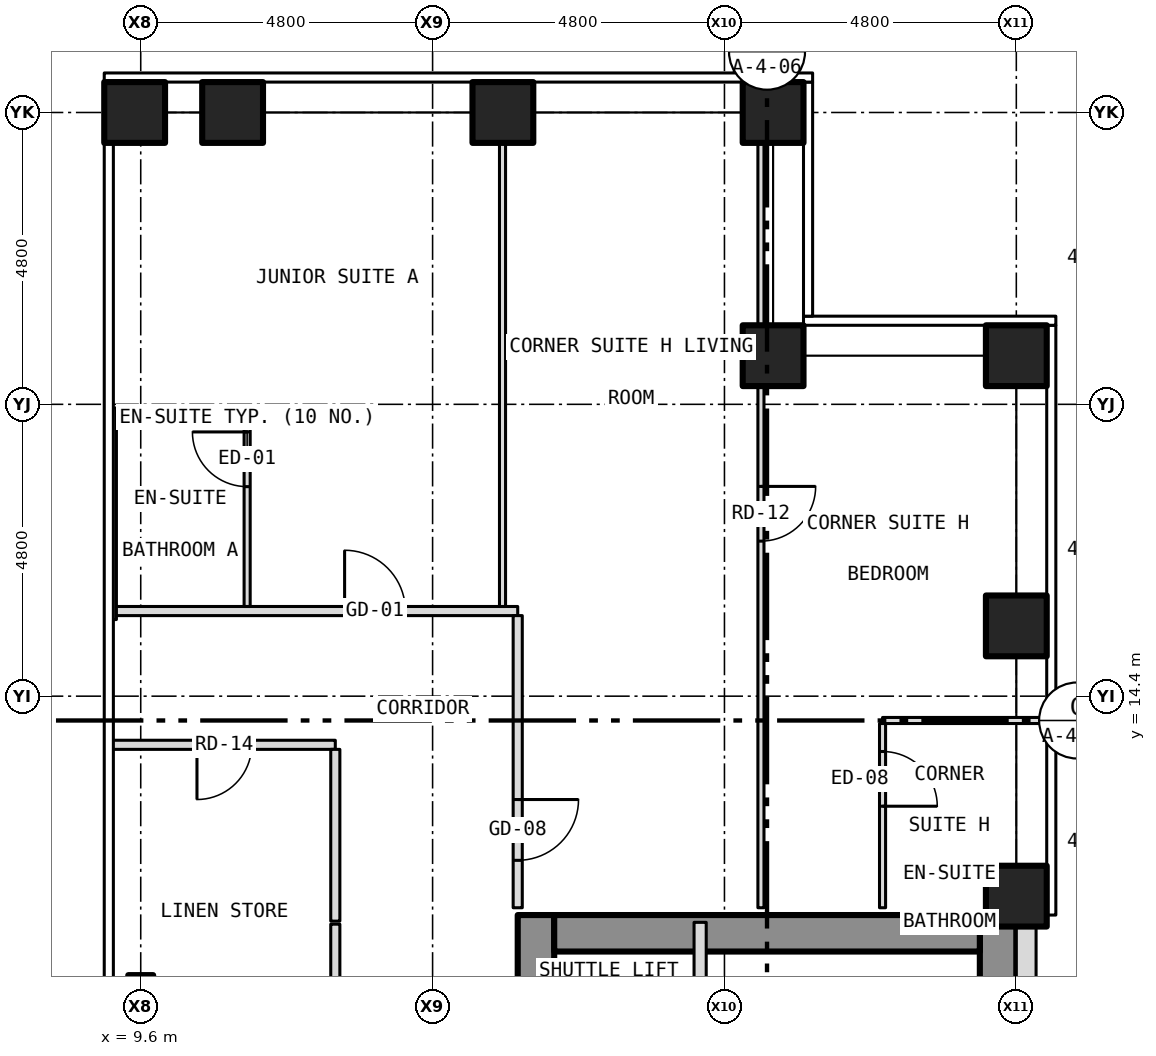
"""IFC4 building model, lengths in metres.
Left out: names, types, materials, properties, quantities, classifications, styles, units other than length and angle.
Written with IfcOpenShell. Run it as: python <this file> out.ifc"""

import sys

from ifc_helpers import new_model, si_unit, direction, frame, frame_2d, origin, origin_2d, place, context, subcontext, project, spatial, rectangle, hollow_rectangle, i_section, extrude, element, fill, save


model = new_model("IFC4")
c1 = context("Model", 3, precision=1e-05, world=origin(), true_north=direction((0.0, 1.0)))
c2 = subcontext(c1, "Body", "Model", "MODEL_VIEW")
j1 = project(units=[si_unit("LENGTHUNIT", "METRE"), si_unit("PLANEANGLEUNIT", "RADIAN")], contexts=[c1])
p1 = place(None, origin())
s1 = spatial("IfcSite", under=j1, at=p1, CompositionType="ELEMENT")
p2 = place(p1, origin())
s2 = spatial("IfcBuilding", under=s1, at=p2, CompositionType="ELEMENT")
p3 = place(p2, frame((0.0, 0.0, 81.0)))
s3 = spatial("IfcBuildingStorey", under=s2, at=p3, CompositionType="ELEMENT", Elevation=81.0)
for number, where, z_axis, x_axis in (
    (1, (11.111, 24.0, -0.15), (0.0, 0.0, 1.0), (1.0, 0.0, 0.0)),
    (2, (15.556, 24.0, -0.15), (0.0, 0.0, 1.0), (1.0, 0.0, 0.0)),
    (3, (20.0, 24.0, -0.15), (0.0, 0.0, 1.0), (1.0, 0.0, 0.0)),
    (4, (24.0, 11.111, -0.15), (0.0, 0.0, 1.0), (1.0, 0.0, 0.0)),
    (5, (24.0, 15.556, -0.15), (0.0, 0.0, 1.0), (1.0, 0.0, 0.0)),
    (6, (24.0, 20.0, -0.15), (0.0, 0.0, 1.0), (1.0, 0.0, 0.0)),
    (7, (20.0, 20.0, -0.15), (0.0, 0.0, 1.0), (1.0, 0.0, 0.0)),
    (8, (9.5, 24.0, -0.15), (0.0, 0.0, 1.0), (1.0, 0.0, 0.0)),
):
    element("IfcColumn", number, at=place(p3, frame(where, z_axis=z_axis, x_axis=x_axis)), inside=s3, PredefinedType="COLUMN", context=c2, shape_type="SweptSolid", body=[
        extrude(hollow_rectangle(XDim=1.0, YDim=1.0, WallThickness=0.06, at=origin_2d()), origin(), (0.0, 0.0, 1.0), 3.35),
    ])
p4 = place(p3, frame((9.6, 9.6, -0.15), z_axis=(0.0, 0.0, 1.0), x_axis=(1.0, 0.0, 0.0)))
e9 = element("IfcColumn", 9, at=p4, inside=s3, PredefinedType="COLUMN", context=c2, shape_type="SweptSolid", body=[
    extrude(i_section(OverallWidth=0.409, OverallDepth=0.424, WebThickness=0.033, FlangeThickness=0.052, at=origin_2d()), origin(), (0.0, 0.0, 1.0), 3.35),
])
p5 = place(p3, frame((16.1, -10.8, 0.0), z_axis=(0.0, 0.0, 1.0), x_axis=(0.0, 1.0, 0.0)))
e10 = element("IfcWall", 10, at=p5, inside=s3, PredefinedType="SHEAR", context=c2, shape_type="SweptSolid", body=[
    extrude(rectangle(XDim=21.6, YDim=0.6, at=frame_2d((10.8, 0.0))), origin(), (0.0, 0.0, 1.0), 2.9),
])
p6 = place(p5, frame((9.4, 0.0, 0.0)))
e11 = element("IfcOpeningElement", 11, at=p6, cuts=e10, PredefinedType="OPENING", context=c2, shape_type="SweptSolid", body=[
    extrude(rectangle(XDim=1.1, YDim=2.1, at=frame_2d((0.55, 1.05))), frame((0.0, 0.312, 0.0), z_axis=(0.0, -1.0, 0.0), x_axis=(1.0, 0.0, 0.0)), (0.0, 0.0, 1.0), 0.624),
])
p7 = place(p5, frame((11.5, 0.0, 0.0)))
e12 = element("IfcOpeningElement", 12, at=p7, cuts=e10, PredefinedType="OPENING", context=c2, shape_type="SweptSolid", body=[
    extrude(rectangle(XDim=1.1, YDim=2.1, at=frame_2d((0.55, 1.05))), frame((0.0, 0.312, 0.0), z_axis=(0.0, -1.0, 0.0), x_axis=(1.0, 0.0, 0.0)), (0.0, 0.0, 1.0), 0.624),
])
p8 = place(p5, frame((13.6, 0.0, 0.0)))
e13 = element("IfcOpeningElement", 13, at=p8, cuts=e10, PredefinedType="OPENING", context=c2, shape_type="SweptSolid", body=[
    extrude(rectangle(XDim=1.1, YDim=2.1, at=frame_2d((0.55, 1.05))), frame((0.0, 0.312, 0.0), z_axis=(0.0, -1.0, 0.0), x_axis=(1.0, 0.0, 0.0)), (0.0, 0.0, 1.0), 0.624),
])
p9 = place(p5, frame((15.7, 0.0, 0.0)))
e14 = element("IfcOpeningElement", 14, at=p9, cuts=e10, PredefinedType="OPENING", context=c2, shape_type="SweptSolid", body=[
    extrude(rectangle(XDim=1.1, YDim=2.1, at=frame_2d((0.55, 1.05))), frame((0.0, 0.312, 0.0), z_axis=(0.0, -1.0, 0.0), x_axis=(1.0, 0.0, 0.0)), (0.0, 0.0, 1.0), 0.624),
])
p10 = place(p5, frame((17.8, 0.0, 0.0)))
e15 = element("IfcOpeningElement", 15, at=p10, cuts=e10, PredefinedType="OPENING", context=c2, shape_type="SweptSolid", body=[
    extrude(rectangle(XDim=1.1, YDim=2.1, at=frame_2d((0.55, 1.05))), frame((0.0, 0.312, 0.0), z_axis=(0.0, -1.0, 0.0), x_axis=(1.0, 0.0, 0.0)), (0.0, 0.0, 1.0), 0.624),
])
p11 = place(p5, frame((5.642, 0.0, 0.0)))
e16 = element("IfcOpeningElement", 16, at=p11, cuts=e10, PredefinedType="OPENING", context=c2, shape_type="SweptSolid", body=[
    extrude(rectangle(XDim=1.1, YDim=2.1, at=frame_2d((0.55, 1.05))), frame((0.0, 0.312, 0.0), z_axis=(0.0, -1.0, 0.0), x_axis=(1.0, 0.0, 0.0)), (0.0, 0.0, 1.0), 0.624),
])
p12 = place(p5, frame((7.5, 0.0, 0.0)))
e17 = element("IfcOpeningElement", 17, at=p12, cuts=e10, PredefinedType="OPENING", context=c2, shape_type="SweptSolid", body=[
    extrude(rectangle(XDim=1.1, YDim=2.1, at=frame_2d((0.55, 1.05))), frame((0.0, 0.312, 0.0), z_axis=(0.0, -1.0, 0.0), x_axis=(1.0, 0.0, 0.0)), (0.0, 0.0, 1.0), 0.624),
])
p13 = place(p3, frame((23.7, -10.8, 0.0), z_axis=(0.0, 0.0, 1.0), x_axis=(0.0, 1.0, 0.0)))
e18 = element("IfcWall", 18, at=p13, inside=s3, PredefinedType="SHEAR", context=c2, shape_type="SweptSolid", body=[
    extrude(rectangle(XDim=21.6, YDim=0.6, at=frame_2d((10.8, 0.0))), origin(), (0.0, 0.0, 1.0), 2.9),
])
p14 = place(p3, frame((16.4, 10.5, 0.0), z_axis=(0.0, 0.0, 1.0), x_axis=(1.0, 0.0, 0.0)))
e19 = element("IfcWall", 19, at=p14, inside=s3, PredefinedType="SHEAR", context=c2, shape_type="SweptSolid", body=[
    extrude(rectangle(XDim=7.0, YDim=0.6, at=frame_2d((3.5, 0.0))), origin(), (0.0, 0.0, 1.0), 2.9),
])
p15 = place(p3, frame((24.163, -10.8, 0.0), z_axis=(0.0, 0.0, 1.0), x_axis=(0.0, 1.0, 0.0)))
e20 = element("IfcWall", 20, at=p15, inside=s3, PredefinedType="SOLIDWALL", context=c2, shape_type="SweptSolid", body=[
    extrude(rectangle(XDim=21.6, YDim=0.325, at=frame_2d((10.8, 0.0))), origin(), (0.0, 0.0, 1.0), 3.5),
])
p16 = place(p15, frame((2.95, 0.0, 1.0)))
e21 = element("IfcOpeningElement", 21, at=p16, cuts=e20, PredefinedType="OPENING", context=c2, shape_type="SweptSolid", body=[
    extrude(rectangle(XDim=0.6, YDim=1.5, at=frame_2d((0.3, 0.75))), frame((0.0, 0.175, 0.0), z_axis=(0.0, -1.0, 0.0), x_axis=(1.0, 0.0, 0.0)), (0.0, 0.0, 1.0), 0.349),
])
p17 = place(p3, frame((9.12, 13.6, 0.0), z_axis=(0.0, 0.0, 1.0), x_axis=(1.0, 0.0, 0.0)))
e22 = element("IfcWall", 22, at=p17, inside=s3, PredefinedType="PARTITIONING", context=c2, shape_type="SweptSolid", body=[
    extrude(rectangle(XDim=3.68, YDim=0.15, at=frame_2d((1.84, 0.0))), origin(), (0.0, 0.0, 1.0), 3.2),
])
p18 = place(p17, frame((1.405, 0.0, 0.0)))
e23 = element("IfcOpeningElement", 23, at=p18, cuts=e22, PredefinedType="OPENING", context=c2, shape_type="SweptSolid", body=[
    extrude(rectangle(XDim=0.9, YDim=2.1, at=frame_2d((0.45, 1.05))), frame((0.0, 0.087, 0.0), z_axis=(0.0, -1.0, 0.0), x_axis=(1.0, 0.0, 0.0)), (0.0, 0.0, 1.0), 0.174),
])
p19 = place(p3, frame((21.8, 14.0, 0.0), z_axis=(0.0, 0.0, 1.0), x_axis=(1.0, 0.0, 0.0)))
e24 = element("IfcWall", 24, at=p19, inside=s3, PredefinedType="PARTITIONING", context=c2, shape_type="SweptSolid", body=[
    extrude(rectangle(XDim=2.73, YDim=0.1, at=frame_2d((1.365, 0.0))), origin(), (0.0, 0.0, 1.0), 3.2),
])
p20 = place(p3, frame((9.15, 15.8, 0.0), z_axis=(0.0, 0.0, 1.0), x_axis=(1.0, 0.0, 0.0)))
e25 = element("IfcWall", 25, at=p20, inside=s3, PredefinedType="PARTITIONING", context=c2, shape_type="SweptSolid", body=[
    extrude(rectangle(XDim=6.65, YDim=0.15, at=frame_2d((3.325, 0.0))), origin(), (0.0, 0.0, 1.0), 3.2),
])
p21 = place(p20, frame((3.803, 0.0, 0.0)))
e26 = element("IfcOpeningElement", 26, at=p21, cuts=e25, PredefinedType="OPENING", context=c2, shape_type="SweptSolid", body=[
    extrude(rectangle(XDim=1.0, YDim=2.1, at=frame_2d((0.5, 1.05))), frame((0.0, 0.087, 0.0), z_axis=(0.0, -1.0, 0.0), x_axis=(1.0, 0.0, 0.0)), (0.0, 0.0, 1.0), 0.174),
])
p22 = place(p3, frame((9.15, 19.0, 0.0), z_axis=(0.0, 0.0, 1.0), x_axis=(1.0, 0.0, 0.0)))
e27 = element("IfcWall", 27, at=p22, inside=s3, PredefinedType="PARTITIONING", context=c2, shape_type="SweptSolid", body=[
    extrude(rectangle(XDim=2.2, YDim=0.1, at=frame_2d((1.1, 0.0))), origin(), (0.0, 0.0, 1.0), 3.2),
])
p23 = place(p3, frame((9.15, 15.66, 0.0), z_axis=(0.0, 0.0, 1.0), x_axis=(0.0, 1.0, 0.0)))
e28 = element("IfcWall", 28, at=p23, inside=s3, PredefinedType="PARTITIONING", context=c2, shape_type="SweptSolid", body=[
    extrude(rectangle(XDim=3.48, YDim=0.1, at=frame_2d((1.74, 0.0))), origin(), (0.0, 0.0, 1.0), 3.2),
])
p24 = place(p3, frame((11.35, 15.875, 0.0), z_axis=(0.0, 0.0, 1.0), x_axis=(0.0, 1.0, 0.0)))
e29 = element("IfcWall", 29, at=p24, inside=s3, PredefinedType="PARTITIONING", context=c2, shape_type="SweptSolid", body=[
    extrude(rectangle(XDim=3.075, YDim=0.1, at=frame_2d((1.538, 0.0))), origin(), (0.0, 0.0, 1.0), 3.2),
])
p25 = place(p24, frame((1.971, 0.0, 0.0)))
e30 = element("IfcOpeningElement", 30, at=p25, cuts=e29, PredefinedType="OPENING", context=c2, shape_type="SweptSolid", body=[
    extrude(rectangle(XDim=0.9, YDim=2.1, at=frame_2d((0.45, 1.05))), frame((0.0, 0.062, 0.0), z_axis=(0.0, -1.0, 0.0), x_axis=(1.0, 0.0, 0.0)), (0.0, 0.0, 1.0), 0.124),
])
p26 = place(p3, frame((12.8, 8.175, 0.0), z_axis=(0.0, 0.0, 1.0), x_axis=(0.0, 1.0, 0.0)))
e31 = element("IfcWall", 31, at=p26, inside=s3, PredefinedType="PARTITIONING", context=c2, shape_type="SweptSolid", body=[
    extrude(rectangle(XDim=2.475, YDim=0.15, at=frame_2d((1.237, 0.0))), origin(), (0.0, 0.0, 1.0), 3.2),
])
p27 = place(p3, frame((12.8, 10.7, 0.0), z_axis=(0.0, 0.0, 1.0), x_axis=(0.0, 1.0, 0.0)))
e32 = element("IfcWall", 32, at=p27, inside=s3, PredefinedType="PARTITIONING", context=c2, shape_type="SweptSolid", body=[
    extrude(rectangle(XDim=2.825, YDim=0.15, at=frame_2d((1.413, 0.0))), origin(), (0.0, 0.0, 1.0), 3.2),
])
p28 = place(p3, frame((15.55, 15.875, 0.0), z_axis=(0.0, 0.0, 1.0), x_axis=(0.0, 1.0, 0.0)))
e33 = element("IfcWall", 33, at=p28, inside=s3, PredefinedType="PARTITIONING", context=c2, shape_type="SweptSolid", body=[
    extrude(rectangle(XDim=8.005, YDim=0.1, at=frame_2d((4.002, 0.0))), origin(), (0.0, 0.0, 1.0), 3.2),
])
p29 = place(p3, frame((15.8, 10.92, 0.0), z_axis=(0.0, 0.0, 1.0), x_axis=(0.0, 1.0, 0.0)))
e34 = element("IfcWall", 34, at=p29, inside=s3, PredefinedType="PARTITIONING", context=c2, shape_type="SweptSolid", body=[
    extrude(rectangle(XDim=4.805, YDim=0.15, at=frame_2d((2.403, 0.0))), origin(), (0.0, 0.0, 1.0), 3.2),
])
p30 = place(p29, frame((0.78, 0.0, 0.0)))
e35 = element("IfcOpeningElement", 35, at=p30, cuts=e34, PredefinedType="OPENING", context=c2, shape_type="SweptSolid", body=[
    extrude(rectangle(XDim=1.0, YDim=2.1, at=frame_2d((0.5, 1.05))), frame((0.0, 0.087, 0.0), z_axis=(0.0, -1.0, 0.0), x_axis=(1.0, 0.0, 0.0)), (0.0, 0.0, 1.0), 0.174),
])
p31 = place(p3, frame((18.8, -1.8, 0.0), z_axis=(0.0, 0.0, 1.0), x_axis=(0.0, 1.0, 0.0)))
e36 = element("IfcWall", 36, at=p31, inside=s3, PredefinedType="PARTITIONING", context=c2, shape_type="SweptSolid", body=[
    extrude(rectangle(XDim=12.48, YDim=0.2, at=frame_2d((6.24, 0.0))), origin(), (0.0, 0.0, 1.0), 2.9),
])
p32 = place(p3, frame((19.8, 10.92, 0.0), z_axis=(0.0, 0.0, 1.0), x_axis=(0.0, 1.0, 0.0)))
e37 = element("IfcWall", 37, at=p32, inside=s3, PredefinedType="PARTITIONING", context=c2, shape_type="SweptSolid", body=[
    extrude(rectangle(XDim=12.96, YDim=0.1, at=frame_2d((6.48, 0.0))), origin(), (0.0, 0.0, 1.0), 3.2),
])
p33 = place(p32, frame((6.03, 0.0, 0.0)))
e38 = element("IfcOpeningElement", 38, at=p33, cuts=e37, PredefinedType="OPENING", context=c2, shape_type="SweptSolid", body=[
    extrude(rectangle(XDim=0.9, YDim=2.1, at=frame_2d((0.45, 1.05))), frame((0.0, 0.062, 0.0), z_axis=(0.0, -1.0, 0.0), x_axis=(1.0, 0.0, 0.0)), (0.0, 0.0, 1.0), 0.124),
])
p34 = place(p3, frame((21.8, 10.92, 0.0), z_axis=(0.0, 0.0, 1.0), x_axis=(0.0, 1.0, 0.0)))
e39 = element("IfcWall", 39, at=p34, inside=s3, PredefinedType="PARTITIONING", context=c2, shape_type="SweptSolid", body=[
    extrude(rectangle(XDim=3.03, YDim=0.1, at=frame_2d((1.515, 0.0))), origin(), (0.0, 0.0, 1.0), 3.2),
])
p35 = place(p34, frame((1.67, 0.0, 0.0)))
e40 = element("IfcOpeningElement", 40, at=p35, cuts=e39, PredefinedType="OPENING", context=c2, shape_type="SweptSolid", body=[
    extrude(rectangle(XDim=0.9, YDim=2.1, at=frame_2d((0.45, 1.05))), frame((0.0, 0.062, 0.0), z_axis=(0.0, -1.0, 0.0), x_axis=(1.0, 0.0, 0.0)), (0.0, 0.0, 1.0), 0.124),
])
p36 = place(p21, origin())
e41 = element("IfcDoor", 41, at=p36, inside=s3, OperationType="SINGLE_SWING_LEFT", PredefinedType="DOOR", context=c2, shape_type="SweptSolid", body=[
    extrude(rectangle(XDim=1.0, YDim=2.1, at=frame_2d((0.5, 1.05))), frame((0.0, 0.025, 0.0), z_axis=(0.0, -1.0, 0.0), x_axis=(1.0, 0.0, 0.0)), (0.0, 0.0, 1.0), 0.05),
])
fill(e26, e41)
p37 = place(p25, origin())
e42 = element("IfcDoor", 42, at=p37, inside=s3, OperationType="SINGLE_SWING_RIGHT", PredefinedType="DOOR", context=c2, shape_type="SweptSolid", body=[
    extrude(rectangle(XDim=0.9, YDim=2.1, at=frame_2d((0.45, 1.05))), frame((0.0, 0.025, 0.0), z_axis=(0.0, -1.0, 0.0), x_axis=(1.0, 0.0, 0.0)), (0.0, 0.0, 1.0), 0.05),
])
fill(e30, e42)
p38 = place(p30, origin())
e43 = element("IfcDoor", 43, at=p38, inside=s3, OperationType="SINGLE_SWING_RIGHT", PredefinedType="DOOR", context=c2, shape_type="SweptSolid", body=[
    extrude(rectangle(XDim=1.0, YDim=2.1, at=frame_2d((0.5, 1.05))), frame((0.0, 0.025, 0.0), z_axis=(0.0, -1.0, 0.0), x_axis=(1.0, 0.0, 0.0)), (0.0, 0.0, 1.0), 0.05),
])
fill(e35, e43)
p39 = place(p33, origin())
e44 = element("IfcDoor", 44, at=p39, inside=s3, OperationType="SINGLE_SWING_RIGHT", PredefinedType="DOOR", context=c2, shape_type="SweptSolid", body=[
    extrude(rectangle(XDim=0.9, YDim=2.1, at=frame_2d((0.45, 1.05))), frame((0.0, 0.025, 0.0), z_axis=(0.0, -1.0, 0.0), x_axis=(1.0, 0.0, 0.0)), (0.0, 0.0, 1.0), 0.05),
])
fill(e38, e44)
p40 = place(p35, origin())
e45 = element("IfcDoor", 45, at=p40, inside=s3, OperationType="SINGLE_SWING_LEFT", PredefinedType="DOOR", context=c2, shape_type="SweptSolid", body=[
    extrude(rectangle(XDim=0.9, YDim=2.1, at=frame_2d((0.45, 1.05))), frame((0.0, 0.025, 0.0), z_axis=(0.0, -1.0, 0.0), x_axis=(1.0, 0.0, 0.0)), (0.0, 0.0, 1.0), 0.05),
])
fill(e40, e45)
p41 = place(p18, origin())
e46 = element("IfcDoor", 46, at=p41, inside=s3, OperationType="SINGLE_SWING_LEFT", PredefinedType="DOOR", context=c2, shape_type="SweptSolid", body=[
    extrude(rectangle(XDim=0.9, YDim=2.1, at=frame_2d((0.45, 1.05))), frame((0.0, 0.025, 0.0), z_axis=(0.0, -1.0, 0.0), x_axis=(1.0, 0.0, 0.0)), (0.0, 0.0, 1.0), 0.05),
])
fill(e23, e46)
save(model, sys.argv[1])
